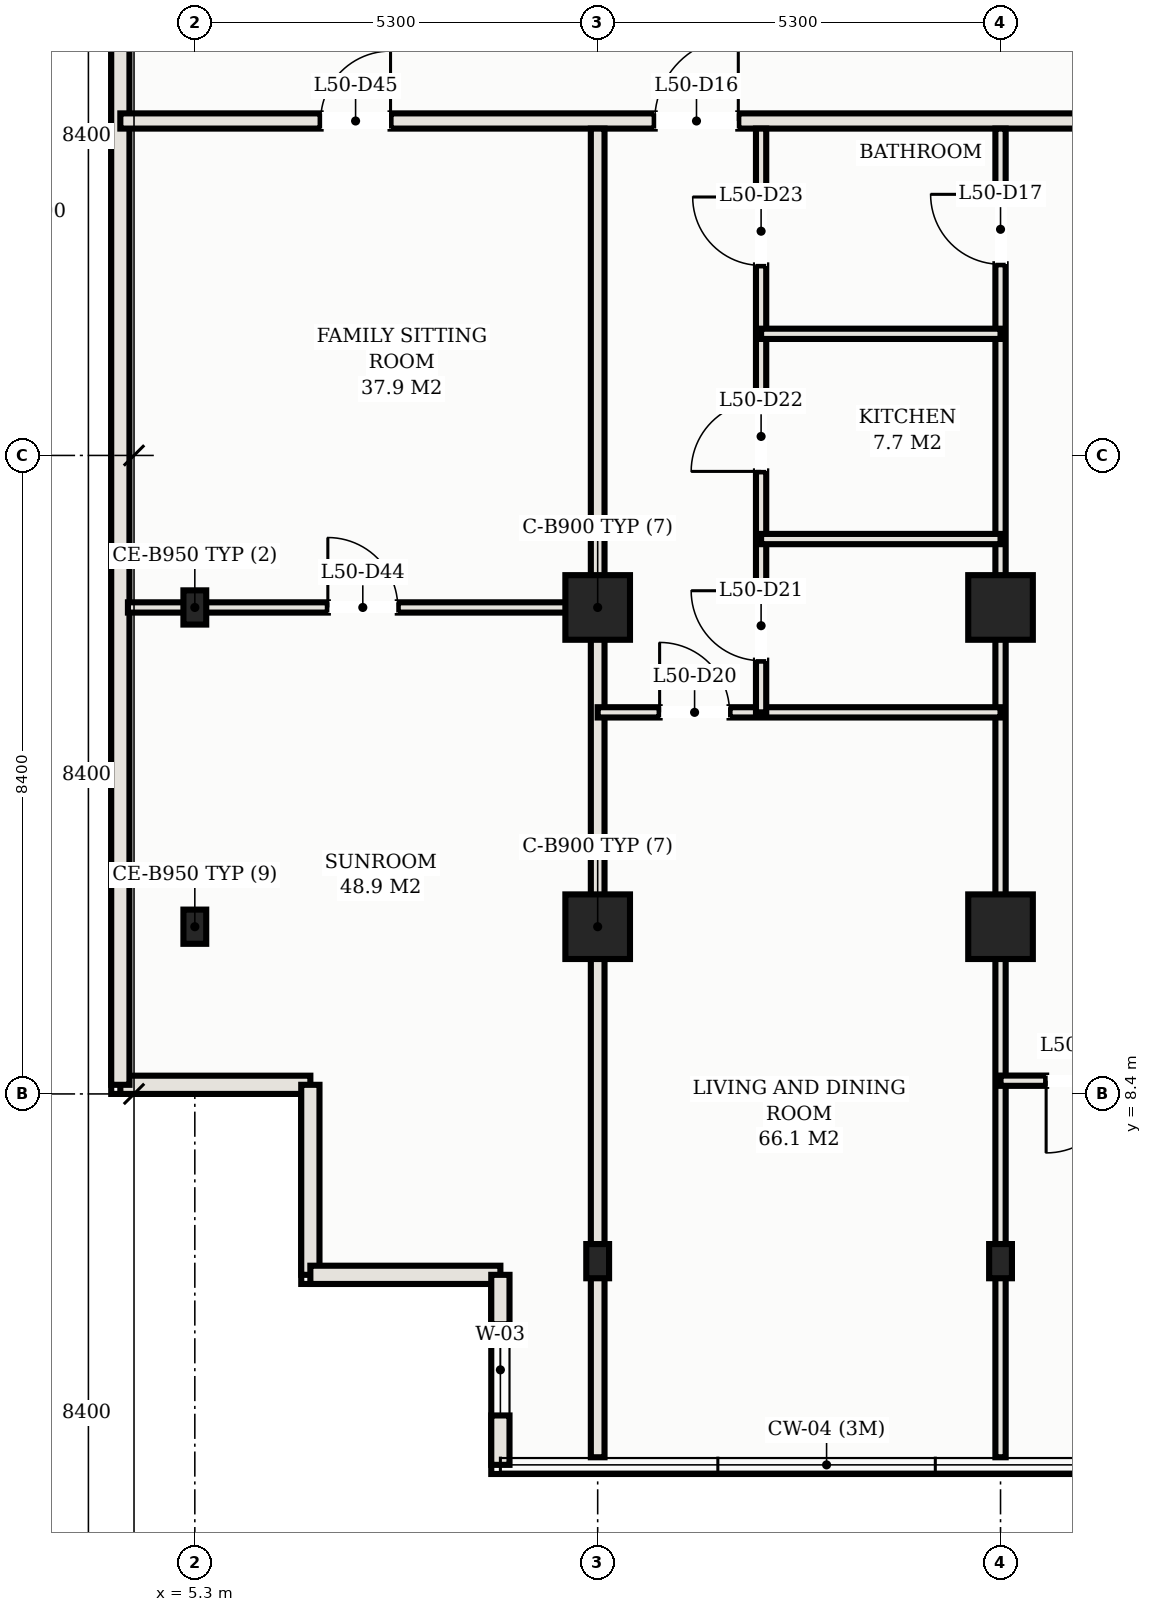
"""IFC4 building model, lengths in metres.
Left out: names, types, materials, properties, quantities, classifications, styles, units other than length and angle.
Written with IfcOpenShell. Run it as: python <this file> out.ifc"""

import sys

from ifc_helpers import new_model, si_unit, direction, frame, frame_2d, origin, origin_2d, place, context, subcontext, project, spatial, rectangle, hollow_rectangle, extrude, element, fill, save


model = new_model("IFC4")
c1 = context("Model", 3, precision=1e-05, world=origin(), true_north=direction((0.0, 1.0)))
c2 = subcontext(c1, "Body", "Model", "MODEL_VIEW")
j1 = project(units=[si_unit("LENGTHUNIT", "METRE"), si_unit("PLANEANGLEUNIT", "RADIAN")], contexts=[c1])
p1 = place(None, origin())
s1 = spatial("IfcSite", under=j1, at=p1, CompositionType="ELEMENT")
p2 = place(p1, origin())
s2 = spatial("IfcBuilding", under=s1, at=p2, CompositionType="ELEMENT")
p3 = place(p2, frame((0.0, 0.0, 182.1)))
s3 = spatial("IfcBuildingStorey", under=s2, at=p3, CompositionType="ELEMENT", Elevation=182.1)
for number, where, z_axis, x_axis in (
    (1, (10.6, 14.8, 0.0), (0.0, 0.0, 1.0), (1.0, 0.0, 0.0)),
    (2, (10.6, 10.6, 0.0), (0.0, 0.0, 1.0), (1.0, 0.0, 0.0)),
    (3, (15.9, 14.8, 0.0), (0.0, 0.0, 1.0), (1.0, 0.0, 0.0)),
    (4, (15.9, 10.6, 0.0), (0.0, 0.0, 1.0), (1.0, 0.0, 0.0)),
):
    element("IfcColumn", number, at=place(p3, frame(where, z_axis=z_axis, x_axis=x_axis)), inside=s3, PredefinedType="COLUMN", context=c2, shape_type="SweptSolid", body=[
        extrude(hollow_rectangle(XDim=0.85, YDim=0.85, WallThickness=0.028, at=origin_2d()), origin(), (0.0, 0.0, 1.0), 3.3),
    ])
for number, where, z_axis, x_axis in (
    (5, (10.6, 6.2, 0.0), (0.0, 0.0, 1.0), (1.0, 0.0, 0.0)),
    (6, (15.9, 6.2, 0.0), (0.0, 0.0, 1.0), (1.0, 0.0, 0.0)),
    (7, (5.3, 10.6, 0.0), (0.0, 0.0, 1.0), (1.0, 0.0, 0.0)),
    (8, (5.3, 14.8, 0.0), (0.0, 0.0, 1.0), (1.0, 0.0, 0.0)),
):
    element("IfcColumn", number, at=place(p3, frame(where, z_axis=z_axis, x_axis=x_axis)), inside=s3, PredefinedType="COLUMN", context=c2, shape_type="SweptSolid", body=[
        extrude(hollow_rectangle(XDim=0.3, YDim=0.45, WallThickness=0.016, at=origin_2d()), origin(), (0.0, 0.0, 1.0), 3.3),
    ])
for number, where, z_axis, x_axis in (
    (9, (4.32, 8.52, 0.0), (0.0, 0.0, 1.0), (1.0, 0.0, 0.0)),
    (10, (6.82, 8.52, 0.0), (0.0, 0.0, 1.0), (0.0, -1.0, 0.0)),
    (11, (6.82, 6.02, 0.0), (0.0, 0.0, 1.0), (1.0, 0.0, 0.0)),
):
    element("IfcWall", number, at=place(p3, frame(where, z_axis=z_axis, x_axis=x_axis)), inside=s3, PredefinedType="SOLIDWALL", context=c2, shape_type="SweptSolid", body=[
        extrude(rectangle(XDim=2.5, YDim=0.24, at=frame_2d((1.25, 0.0))), origin(), (0.0, 0.0, 1.0), 3.03),
    ])
p4 = place(p3, frame((9.32, 6.02, 0.0), z_axis=(0.0, 0.0, 1.0), x_axis=(0.0, -1.0, 0.0)))
e12 = element("IfcWall", 12, at=p4, inside=s3, PredefinedType="SOLIDWALL", context=c2, shape_type="SweptSolid", body=[
    extrude(rectangle(XDim=2.5, YDim=0.24, at=frame_2d((1.25, 0.0))), origin(), (0.0, 0.0, 1.0), 3.03),
])
p5 = place(p4, frame((0.65, 0.0, 0.75)))
e13 = element("IfcOpeningElement", 13, at=p5, cuts=e12, PredefinedType="OPENING", context=c2, shape_type="SweptSolid", body=[
    extrude(rectangle(XDim=1.2, YDim=1.5, at=frame_2d((0.6, 0.75))), frame((0.0, 0.13, 0.0), z_axis=(0.0, -1.0, 0.0), x_axis=(1.0, 0.0, 0.0)), (0.0, 0.0, 1.0), 0.26),
])
p6 = place(p3, frame((4.32, 35.93, 0.0), z_axis=(0.0, 0.0, 1.0), x_axis=(0.0, -1.0, 0.0)))
e14 = element("IfcWall", 14, at=p6, inside=s3, PredefinedType="SOLIDWALL", context=c2, shape_type="SweptSolid", body=[
    extrude(rectangle(XDim=27.41, YDim=0.24, at=frame_2d((13.705, 0.0))), origin(), (0.0, 0.0, 1.0), 3.03),
])
p7 = place(p3, frame((4.32, 21.2, 0.0), z_axis=(0.0, 0.0, 1.0), x_axis=(1.0, 0.0, 0.0)))
e15 = element("IfcWall", 15, at=p7, inside=s3, PredefinedType="PARTITIONING", context=c2, shape_type="SweptSolid", body=[
    extrude(rectangle(XDim=44.36, YDim=0.2, at=frame_2d((22.18, 0.0))), origin(), (0.0, 0.0, 1.0), 2.57),
])
p8 = place(p7, frame((7.03, 0.0, 0.0)))
e16 = element("IfcOpeningElement", 16, at=p8, cuts=e15, PredefinedType="OPENING", context=c2, shape_type="SweptSolid", body=[
    extrude(rectangle(XDim=1.1, YDim=2.25, at=frame_2d((0.55, 1.125))), frame((0.0, 0.11, 0.0), z_axis=(0.0, -1.0, 0.0), x_axis=(1.0, 0.0, 0.0)), (0.0, 0.0, 1.0), 0.22),
])
p9 = place(p7, frame((28.23, 0.0, 0.0)))
e17 = element("IfcOpeningElement", 17, at=p9, cuts=e15, PredefinedType="OPENING", context=c2, shape_type="SweptSolid", body=[
    extrude(rectangle(XDim=1.1, YDim=2.25, at=frame_2d((0.55, 1.125))), frame((0.0, 0.11, 0.0), z_axis=(0.0, -1.0, 0.0), x_axis=(1.0, 0.0, 0.0)), (0.0, 0.0, 1.0), 0.22),
])
p10 = place(p7, frame((2.635, 0.0, 0.0)))
e18 = element("IfcOpeningElement", 18, at=p10, cuts=e15, PredefinedType="OPENING", context=c2, shape_type="SweptSolid", body=[
    extrude(rectangle(XDim=0.92, YDim=2.15, at=frame_2d((0.46, 1.075))), frame((0.0, 0.11, 0.0), z_axis=(0.0, -1.0, 0.0), x_axis=(1.0, 0.0, 0.0)), (0.0, 0.0, 1.0), 0.22),
])
p11 = place(p7, frame((40.805, 0.0, 0.0)))
e19 = element("IfcOpeningElement", 19, at=p11, cuts=e15, PredefinedType="OPENING", context=c2, shape_type="SweptSolid", body=[
    extrude(rectangle(XDim=0.92, YDim=2.15, at=frame_2d((0.46, 1.075))), frame((0.0, 0.11, 0.0), z_axis=(0.0, -1.0, 0.0), x_axis=(1.0, 0.0, 0.0)), (0.0, 0.0, 1.0), 0.22),
])
p12 = place(p3, frame((10.6, 3.62, 0.0), z_axis=(0.0, 0.0, 1.0), x_axis=(0.0, 1.0, 0.0)))
e20 = element("IfcWall", 20, at=p12, inside=s3, PredefinedType="PARTITIONING", context=c2, shape_type="SweptSolid", body=[
    extrude(rectangle(XDim=17.48, YDim=0.18, at=frame_2d((8.74, 0.0))), origin(), (0.0, 0.0, 1.0), 2.325),
])
p13 = place(p3, frame((15.9, 3.62, 0.0), z_axis=(0.0, 0.0, 1.0), x_axis=(0.0, 1.0, 0.0)))
e21 = element("IfcWall", 21, at=p13, inside=s3, PredefinedType="PARTITIONING", context=c2, shape_type="SweptSolid", body=[
    extrude(rectangle(XDim=17.48, YDim=0.135, at=frame_2d((8.74, 0.0))), origin(), (0.0, 0.0, 1.0), 2.325),
])
p14 = place(p13, frame((15.695, 0.0, 0.0)))
e22 = element("IfcOpeningElement", 22, at=p14, cuts=e21, PredefinedType="OPENING", context=c2, shape_type="SweptSolid", body=[
    extrude(rectangle(XDim=0.92, YDim=2.15, at=frame_2d((0.46, 1.075))), frame((0.0, 0.078, 0.0), z_axis=(0.0, -1.0, 0.0), x_axis=(1.0, 0.0, 0.0)), (0.0, 0.0, 1.0), 0.155),
])
p15 = place(p3, frame((10.6, 13.42, 0.0), z_axis=(0.0, 0.0, 1.0), x_axis=(1.0, 0.0, 0.0)))
e23 = element("IfcWall", 23, at=p15, inside=s3, PredefinedType="PARTITIONING", context=c2, shape_type="SweptSolid", body=[
    extrude(rectangle(XDim=5.3, YDim=0.135, at=frame_2d((2.65, 0.0))), origin(), (0.0, 0.0, 1.0), 2.57),
])
p16 = place(p15, frame((0.815, 0.0, 0.0)))
e24 = element("IfcOpeningElement", 24, at=p16, cuts=e23, PredefinedType="OPENING", context=c2, shape_type="SweptSolid", body=[
    extrude(rectangle(XDim=0.92, YDim=2.15, at=frame_2d((0.46, 1.075))), frame((0.0, 0.078, 0.0), z_axis=(0.0, -1.0, 0.0), x_axis=(1.0, 0.0, 0.0)), (0.0, 0.0, 1.0), 0.155),
])
p17 = place(p3, frame((12.75, 13.42, 0.0), z_axis=(0.0, 0.0, 1.0), x_axis=(0.0, 1.0, 0.0)))
e25 = element("IfcWall", 25, at=p17, inside=s3, PredefinedType="PARTITIONING", context=c2, shape_type="SweptSolid", body=[
    extrude(rectangle(XDim=7.68, YDim=0.135, at=frame_2d((3.84, 0.0))), origin(), (0.0, 0.0, 1.0), 2.57),
])
p18 = place(p17, frame((0.68, 0.0, 0.0)))
e26 = element("IfcOpeningElement", 26, at=p18, cuts=e25, PredefinedType="OPENING", context=c2, shape_type="SweptSolid", body=[
    extrude(rectangle(XDim=0.92, YDim=2.15, at=frame_2d((0.46, 1.075))), frame((0.0, 0.078, 0.0), z_axis=(0.0, -1.0, 0.0), x_axis=(1.0, 0.0, 0.0)), (0.0, 0.0, 1.0), 0.155),
])
p19 = place(p17, frame((3.17, 0.0, 0.0)))
e27 = element("IfcOpeningElement", 27, at=p19, cuts=e25, PredefinedType="OPENING", context=c2, shape_type="SweptSolid", body=[
    extrude(rectangle(XDim=0.92, YDim=2.15, at=frame_2d((0.46, 1.075))), frame((0.0, 0.078, 0.0), z_axis=(0.0, -1.0, 0.0), x_axis=(1.0, 0.0, 0.0)), (0.0, 0.0, 1.0), 0.155),
])
p20 = place(p17, frame((5.88, 0.0, 0.0)))
e28 = element("IfcOpeningElement", 28, at=p20, cuts=e25, PredefinedType="OPENING", context=c2, shape_type="SweptSolid", body=[
    extrude(rectangle(XDim=0.9, YDim=2.15, at=frame_2d((0.45, 1.075))), frame((0.0, 0.078, 0.0), z_axis=(0.0, -1.0, 0.0), x_axis=(1.0, 0.0, 0.0)), (0.0, 0.0, 1.0), 0.155),
])
for number, where, z_axis, x_axis in (
    (29, (12.75, 15.7, 0.0), (0.0, 0.0, 1.0), (1.0, 0.0, 0.0)),
    (30, (12.75, 18.4, 0.0), (0.0, 0.0, 1.0), (1.0, 0.0, 0.0)),
):
    element("IfcWall", number, at=place(p3, frame(where, z_axis=z_axis, x_axis=x_axis)), inside=s3, PredefinedType="PARTITIONING", context=c2, shape_type="SweptSolid", body=[
        extrude(rectangle(XDim=3.15, YDim=0.135, at=frame_2d((1.575, 0.0))), origin(), (0.0, 0.0, 1.0), 2.57),
    ])
p21 = place(p3, frame((15.9, 8.574, 0.0), z_axis=(0.0, 0.0, 1.0), x_axis=(1.0, 0.0, 0.0)))
e31 = element("IfcWall", 31, at=p21, inside=s3, PredefinedType="PARTITIONING", context=c2, shape_type="SweptSolid", body=[
    extrude(rectangle(XDim=5.3, YDim=0.135, at=frame_2d((2.65, 0.0))), origin(), (0.0, 0.0, 1.0), 2.57),
])
p22 = place(p21, frame((0.6, 0.0, 0.0)))
e32 = element("IfcOpeningElement", 32, at=p22, cuts=e31, PredefinedType="OPENING", context=c2, shape_type="SweptSolid", body=[
    extrude(rectangle(XDim=0.95, YDim=2.15, at=frame_2d((0.475, 1.075))), frame((0.0, 0.078, 0.0), z_axis=(0.0, -1.0, 0.0), x_axis=(1.0, 0.0, 0.0)), (0.0, 0.0, 1.0), 0.155),
])
p23 = place(p21, frame((3.275, 0.0, 0.0)))
e33 = element("IfcOpeningElement", 33, at=p23, cuts=e31, PredefinedType="OPENING", context=c2, shape_type="SweptSolid", body=[
    extrude(rectangle(XDim=0.9, YDim=2.15, at=frame_2d((0.45, 1.075))), frame((0.0, 0.078, 0.0), z_axis=(0.0, -1.0, 0.0), x_axis=(1.0, 0.0, 0.0)), (0.0, 0.0, 1.0), 0.155),
])
p24 = place(p3, frame((4.42, 14.8, 0.0), z_axis=(0.0, 0.0, 1.0), x_axis=(1.0, 0.0, 0.0)))
e34 = element("IfcWall", 34, at=p24, inside=s3, PredefinedType="PARTITIONING", context=c2, shape_type="SweptSolid", body=[
    extrude(rectangle(XDim=6.18, YDim=0.135, at=frame_2d((3.09, 0.0))), origin(), (0.0, 0.0, 1.0), 2.325),
])
p25 = place(p24, frame((2.63, 0.0, 0.0)))
e35 = element("IfcOpeningElement", 35, at=p25, cuts=e34, PredefinedType="OPENING", context=c2, shape_type="SweptSolid", body=[
    extrude(rectangle(XDim=0.92, YDim=2.15, at=frame_2d((0.46, 1.075))), frame((0.0, 0.078, 0.0), z_axis=(0.0, -1.0, 0.0), x_axis=(1.0, 0.0, 0.0)), (0.0, 0.0, 1.0), 0.155),
])
p26 = place(p5, origin())
e36 = element("IfcWindow", 36, at=p26, inside=s3, PartitioningType="SINGLE_PANEL", PredefinedType="WINDOW", context=c2, shape_type="SweptSolid", body=[
    extrude(rectangle(XDim=1.2, YDim=1.5, at=frame_2d((0.6, 0.75))), frame((0.0, 0.03, 0.0), z_axis=(0.0, -1.0, 0.0), x_axis=(1.0, 0.0, 0.0)), (0.0, 0.0, 1.0), 0.06),
])
fill(e13, e36)
p27 = place(p8, origin())
e37 = element("IfcDoor", 37, at=p27, inside=s3, OperationType="SINGLE_SWING_RIGHT", PredefinedType="DOOR", context=c2, shape_type="SweptSolid", body=[
    extrude(rectangle(XDim=1.1, YDim=2.25, at=frame_2d((0.55, 1.125))), frame((0.0, 0.025, 0.0), z_axis=(0.0, -1.0, 0.0), x_axis=(1.0, 0.0, 0.0)), (0.0, 0.0, 1.0), 0.05),
])
fill(e16, e37)
p28 = place(p14, origin())
e38 = element("IfcDoor", 38, at=p28, inside=s3, OperationType="SINGLE_SWING_RIGHT", PredefinedType="DOOR", context=c2, shape_type="SweptSolid", body=[
    extrude(rectangle(XDim=0.92, YDim=2.15, at=frame_2d((0.46, 1.075))), frame((0.0, 0.025, 0.0), z_axis=(0.0, -1.0, 0.0), x_axis=(1.0, 0.0, 0.0)), (0.0, 0.0, 1.0), 0.05),
])
fill(e22, e38)
p29 = place(p16, origin())
e39 = element("IfcDoor", 39, at=p29, inside=s3, OperationType="SINGLE_SWING_LEFT", PredefinedType="DOOR", context=c2, shape_type="SweptSolid", body=[
    extrude(rectangle(XDim=0.92, YDim=2.15, at=frame_2d((0.46, 1.075))), frame((0.0, 0.025, 0.0), z_axis=(0.0, -1.0, 0.0), x_axis=(1.0, 0.0, 0.0)), (0.0, 0.0, 1.0), 0.05),
])
fill(e24, e39)
p30 = place(p18, origin())
e40 = element("IfcDoor", 40, at=p30, inside=s3, OperationType="SINGLE_SWING_RIGHT", PredefinedType="DOOR", context=c2, shape_type="SweptSolid", body=[
    extrude(rectangle(XDim=0.92, YDim=2.15, at=frame_2d((0.46, 1.075))), frame((0.0, 0.025, 0.0), z_axis=(0.0, -1.0, 0.0), x_axis=(1.0, 0.0, 0.0)), (0.0, 0.0, 1.0), 0.05),
])
fill(e26, e40)
p31 = place(p19, origin())
e41 = element("IfcDoor", 41, at=p31, inside=s3, OperationType="SINGLE_SWING_LEFT", PredefinedType="DOOR", context=c2, shape_type="SweptSolid", body=[
    extrude(rectangle(XDim=0.92, YDim=2.15, at=frame_2d((0.46, 1.075))), frame((0.0, 0.025, 0.0), z_axis=(0.0, -1.0, 0.0), x_axis=(1.0, 0.0, 0.0)), (0.0, 0.0, 1.0), 0.05),
])
fill(e27, e41)
p32 = place(p20, origin())
e42 = element("IfcDoor", 42, at=p32, inside=s3, OperationType="SINGLE_SWING_RIGHT", PredefinedType="DOOR", context=c2, shape_type="SweptSolid", body=[
    extrude(rectangle(XDim=0.9, YDim=2.15, at=frame_2d((0.45, 1.075))), frame((0.0, 0.025, 0.0), z_axis=(0.0, -1.0, 0.0), x_axis=(1.0, 0.0, 0.0)), (0.0, 0.0, 1.0), 0.05),
])
fill(e28, e42)
p33 = place(p22, frame((0.95, 0.0, 0.0), z_axis=(0.0, 0.0, 1.0), x_axis=(-1.0, 0.0, 0.0)))
e43 = element("IfcDoor", 43, at=p33, inside=s3, OperationType="SINGLE_SWING_RIGHT", PredefinedType="DOOR", context=c2, shape_type="SweptSolid", body=[
    extrude(rectangle(XDim=0.95, YDim=2.15, at=frame_2d((0.475, 1.075))), frame((0.0, 0.025, 0.0), z_axis=(0.0, -1.0, 0.0), x_axis=(1.0, 0.0, 0.0)), (0.0, 0.0, 1.0), 0.05),
])
fill(e32, e43)
p34 = place(p25, origin())
e44 = element("IfcDoor", 44, at=p34, inside=s3, OperationType="SINGLE_SWING_LEFT", PredefinedType="DOOR", context=c2, shape_type="SweptSolid", body=[
    extrude(rectangle(XDim=0.92, YDim=2.15, at=frame_2d((0.46, 1.075))), frame((0.0, 0.025, 0.0), z_axis=(0.0, -1.0, 0.0), x_axis=(1.0, 0.0, 0.0)), (0.0, 0.0, 1.0), 0.05),
])
fill(e35, e44)
p35 = place(p10, origin())
e45 = element("IfcDoor", 45, at=p35, inside=s3, OperationType="SINGLE_SWING_RIGHT", PredefinedType="DOOR", context=c2, shape_type="SweptSolid", body=[
    extrude(rectangle(XDim=0.92, YDim=2.15, at=frame_2d((0.46, 1.075))), frame((0.0, 0.025, 0.0), z_axis=(0.0, -1.0, 0.0), x_axis=(1.0, 0.0, 0.0)), (0.0, 0.0, 1.0), 0.05),
])
fill(e18, e45)
save(model, sys.argv[1])
